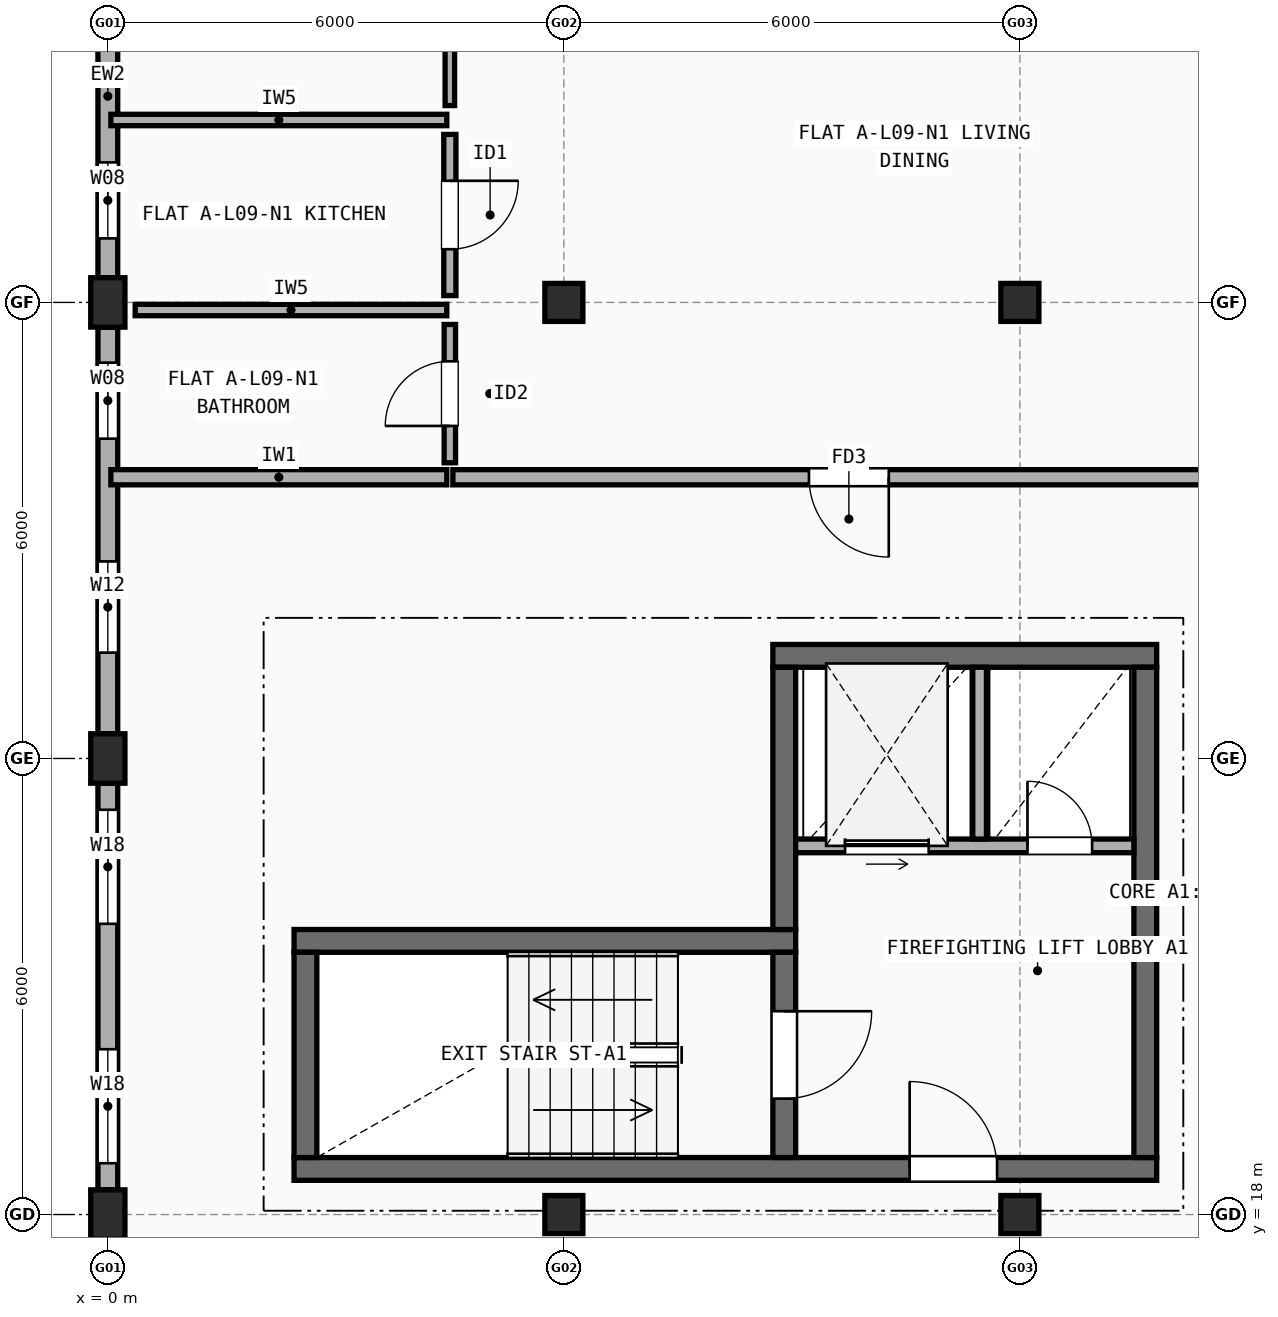
"""IFC4 building model, lengths in metres.
Left out: names, types, materials, properties, quantities, classifications, styles, units other than length and angle.
Written with IfcOpenShell. Run it as: python <this file> out.ifc"""

import sys

from ifc_helpers import new_model, si_unit, direction, frame, frame_2d, origin, origin_2d, place, context, subcontext, project, spatial, rectangle, extrude, element, fill, save


model = new_model("IFC4")
c1 = context("Model", 3, precision=1e-05, world=origin(), true_north=direction((0.0, 1.0)))
c2 = subcontext(c1, "Body", "Model", "MODEL_VIEW")
j1 = project(units=[si_unit("LENGTHUNIT", "METRE"), si_unit("PLANEANGLEUNIT", "RADIAN")], contexts=[c1])
p1 = place(None, origin())
s1 = spatial("IfcSite", under=j1, at=p1, CompositionType="ELEMENT")
p2 = place(p1, origin())
s2 = spatial("IfcBuilding", under=s1, at=p2, CompositionType="ELEMENT")
p3 = place(p2, frame((0.0, 0.0, 30.1)))
s3 = spatial("IfcBuildingStorey", under=s2, at=p3, CompositionType="ELEMENT", Elevation=30.1)
for number, where, z_axis, x_axis in (
    (1, (0.0, 18.0, 0.0), (0.0, 0.0, 1.0), (1.0, 0.0, 0.0)),
    (2, (0.0, 24.0, 0.0), (0.0, 0.0, 1.0), (1.0, 0.0, 0.0)),
    (3, (0.0, 30.0, 0.0), (0.0, 0.0, 1.0), (1.0, 0.0, 0.0)),
):
    element("IfcColumn", number, at=place(p3, frame(where, z_axis=z_axis, x_axis=x_axis)), inside=s3, PredefinedType="COLUMN", context=c2, shape_type="SweptSolid", body=[
        extrude(rectangle(XDim=0.45, YDim=0.65, at=origin_2d()), origin(), (0.0, 0.0, 1.0), 2.985),
    ])
for number, where, z_axis, x_axis in (
    (4, (6.0, 18.0, 0.0), (0.0, 0.0, 1.0), (1.0, 0.0, 0.0)),
    (5, (6.0, 30.0, 0.0), (0.0, 0.0, 1.0), (1.0, 0.0, 0.0)),
    (6, (12.0, 18.0, 0.0), (0.0, 0.0, 1.0), (1.0, 0.0, 0.0)),
    (7, (12.0, 30.0, 0.0), (0.0, 0.0, 1.0), (1.0, 0.0, 0.0)),
):
    element("IfcColumn", number, at=place(p3, frame(where, z_axis=z_axis, x_axis=x_axis)), inside=s3, PredefinedType="COLUMN", context=c2, shape_type="SweptSolid", body=[
        extrude(rectangle(XDim=0.5, YDim=0.5, at=origin_2d()), origin(), (0.0, 0.0, 1.0), 2.985),
    ])
p4 = place(p3, frame((0.0, 35.675, 0.0), z_axis=(0.0, 0.0, 1.0), x_axis=(0.0, -1.0, 0.0)))
e8 = element("IfcWall", 8, at=p4, inside=s3, PredefinedType="STANDARD", context=c2, shape_type="SweptSolid", body=[
    extrude(rectangle(XDim=5.35, YDim=0.26, at=frame_2d((2.675, 0.0))), origin(), (0.0, 0.0, 1.0), 2.467),
])
p5 = place(p4, frame((1.143, 0.0, 0.9)))
e9 = element("IfcOpeningElement", 9, at=p5, cuts=e8, PredefinedType="OPENING", context=c2, shape_type="SweptSolid", body=[
    extrude(rectangle(XDim=0.95, YDim=1.35, at=frame_2d((0.475, 0.675))), frame((0.0, 0.14, 0.0), z_axis=(0.0, -1.0, 0.0), x_axis=(1.0, 0.0, 0.0)), (0.0, 0.0, 1.0), 0.28),
])
p6 = place(p4, frame((3.833, 0.0, 0.9)))
e10 = element("IfcOpeningElement", 10, at=p6, cuts=e8, PredefinedType="OPENING", context=c2, shape_type="SweptSolid", body=[
    extrude(rectangle(XDim=1.0, YDim=1.4, at=frame_2d((0.5, 0.7))), frame((0.0, 0.14, 0.0), z_axis=(0.0, -1.0, 0.0), x_axis=(1.0, 0.0, 0.0)), (0.0, 0.0, 1.0), 0.28),
])
p7 = place(p3, frame((0.0, 29.675, 0.0), z_axis=(0.0, 0.0, 1.0), x_axis=(0.0, -1.0, 0.0)))
e11 = element("IfcWall", 11, at=p7, inside=s3, PredefinedType="STANDARD", context=c2, shape_type="SweptSolid", body=[
    extrude(rectangle(XDim=5.35, YDim=0.26, at=frame_2d((2.675, 0.0))), origin(), (0.0, 0.0, 1.0), 2.467),
])
p8 = place(p7, frame((0.468, 0.0, 0.9)))
e12 = element("IfcOpeningElement", 12, at=p8, cuts=e11, PredefinedType="OPENING", context=c2, shape_type="SweptSolid", body=[
    extrude(rectangle(XDim=1.0, YDim=1.4, at=frame_2d((0.5, 0.7))), frame((0.0, 0.14, 0.0), z_axis=(0.0, -1.0, 0.0), x_axis=(1.0, 0.0, 0.0)), (0.0, 0.0, 1.0), 0.28),
])
p9 = place(p7, frame((3.083, 0.0, 0.9)))
e13 = element("IfcOpeningElement", 13, at=p9, cuts=e11, PredefinedType="OPENING", context=c2, shape_type="SweptSolid", body=[
    extrude(rectangle(XDim=1.2, YDim=1.35, at=frame_2d((0.6, 0.675))), frame((0.0, 0.14, 0.0), z_axis=(0.0, -1.0, 0.0), x_axis=(1.0, 0.0, 0.0)), (0.0, 0.0, 1.0), 0.28),
])
p10 = place(p3, frame((0.0, 23.675, 0.0), z_axis=(0.0, 0.0, 1.0), x_axis=(0.0, -1.0, 0.0)))
e14 = element("IfcWall", 14, at=p10, inside=s3, PredefinedType="STANDARD", context=c2, shape_type="SweptSolid", body=[
    extrude(rectangle(XDim=5.35, YDim=0.26, at=frame_2d((2.675, 0.0))), origin(), (0.0, 0.0, 1.0), 2.467),
])
p11 = place(p10, frame((0.35, 0.0, 0.9)))
e15 = element("IfcOpeningElement", 15, at=p11, cuts=e14, PredefinedType="OPENING", context=c2, shape_type="SweptSolid", body=[
    extrude(rectangle(XDim=1.5, YDim=1.4, at=frame_2d((0.75, 0.7))), frame((0.0, 0.14, 0.0), z_axis=(0.0, -1.0, 0.0), x_axis=(1.0, 0.0, 0.0)), (0.0, 0.0, 1.0), 0.28),
])
p12 = place(p10, frame((3.5, 0.0, 0.9)))
e16 = element("IfcOpeningElement", 16, at=p12, cuts=e14, PredefinedType="OPENING", context=c2, shape_type="SweptSolid", body=[
    extrude(rectangle(XDim=1.5, YDim=1.4, at=frame_2d((0.75, 0.7))), frame((0.0, 0.14, 0.0), z_axis=(0.0, -1.0, 0.0), x_axis=(1.0, 0.0, 0.0)), (0.0, 0.0, 1.0), 0.28),
])
p13 = place(p3, frame((2.45, 18.6, 0.0), z_axis=(0.0, 0.0, 1.0), x_axis=(1.0, 0.0, 0.0)))
e17 = element("IfcWall", 17, at=p13, inside=s3, PredefinedType="SHEAR", context=c2, shape_type="SweptSolid", body=[
    extrude(rectangle(XDim=11.35, YDim=0.3, at=frame_2d((5.675, 0.0))), origin(), (0.0, 0.0, 1.0), 2.985),
])
p14 = place(p13, frame((8.1, 0.0, 0.0)))
e18 = element("IfcOpeningElement", 18, at=p14, cuts=e17, PredefinedType="OPENING", context=c2, shape_type="SweptSolid", body=[
    extrude(rectangle(XDim=1.15, YDim=2.15, at=frame_2d((0.575, 1.075))), frame((0.0, 0.16, 0.0), z_axis=(0.0, -1.0, 0.0), x_axis=(1.0, 0.0, 0.0)), (0.0, 0.0, 1.0), 0.32),
])
p15 = place(p3, frame((9.05, 21.6, 0.0), z_axis=(0.0, 0.0, 1.0), x_axis=(-1.0, 0.0, 0.0)))
e19 = element("IfcWall", 19, at=p15, inside=s3, PredefinedType="SHEAR", context=c2, shape_type="SweptSolid", body=[
    extrude(rectangle(XDim=6.6, YDim=0.3, at=frame_2d((3.3, 0.0))), origin(), (0.0, 0.0, 1.0), 2.985),
])
p16 = place(p3, frame((2.6, 21.45, 0.0), z_axis=(0.0, 0.0, 1.0), x_axis=(0.0, -1.0, 0.0)))
e20 = element("IfcWall", 20, at=p16, inside=s3, PredefinedType="SHEAR", context=c2, shape_type="SweptSolid", body=[
    extrude(rectangle(XDim=2.7, YDim=0.3, at=frame_2d((1.35, 0.0))), origin(), (0.0, 0.0, 1.0), 2.985),
])
p17 = place(p3, frame((8.9, 18.75, 0.0), z_axis=(0.0, 0.0, 1.0), x_axis=(0.0, 1.0, 0.0)))
e21 = element("IfcWall", 21, at=p17, inside=s3, PredefinedType="SHEAR", context=c2, shape_type="SweptSolid", body=[
    extrude(rectangle(XDim=2.7, YDim=0.3, at=frame_2d((1.35, 0.0))), origin(), (0.0, 0.0, 1.0), 2.985),
])
p18 = place(p17, frame((0.775, 0.0, 0.0)))
e22 = element("IfcOpeningElement", 22, at=p18, cuts=e21, PredefinedType="OPENING", context=c2, shape_type="SweptSolid", body=[
    extrude(rectangle(XDim=1.15, YDim=2.15, at=frame_2d((0.575, 1.075))), frame((0.0, 0.16, 0.0), z_axis=(0.0, -1.0, 0.0), x_axis=(1.0, 0.0, 0.0)), (0.0, 0.0, 1.0), 0.32),
])
p19 = place(p3, frame((13.8, 25.35, 0.0), z_axis=(0.0, 0.0, 1.0), x_axis=(-1.0, 0.0, 0.0)))
e23 = element("IfcWall", 23, at=p19, inside=s3, PredefinedType="SHEAR", context=c2, shape_type="SweptSolid", body=[
    extrude(rectangle(XDim=5.05, YDim=0.3, at=frame_2d((2.525, 0.0))), origin(), (0.0, 0.0, 1.0), 2.985),
])
p20 = place(p3, frame((13.65, 18.75, 0.0), z_axis=(0.0, 0.0, 1.0), x_axis=(0.0, 1.0, 0.0)))
e24 = element("IfcWall", 24, at=p20, inside=s3, PredefinedType="SHEAR", context=c2, shape_type="SweptSolid", body=[
    extrude(rectangle(XDim=6.45, YDim=0.3, at=frame_2d((3.225, 0.0))), origin(), (0.0, 0.0, 1.0), 2.985),
])
p21 = place(p3, frame((8.9, 21.75, 0.0), z_axis=(0.0, 0.0, 1.0), x_axis=(0.0, 1.0, 0.0)))
e25 = element("IfcWall", 25, at=p21, inside=s3, PredefinedType="SHEAR", context=c2, shape_type="SweptSolid", body=[
    extrude(rectangle(XDim=3.45, YDim=0.3, at=frame_2d((1.725, 0.0))), origin(), (0.0, 0.0, 1.0), 2.985),
])
p22 = place(p3, frame((9.05, 22.85, 0.0), z_axis=(0.0, 0.0, 1.0), x_axis=(1.0, 0.0, 0.0)))
e26 = element("IfcWall", 26, at=p22, inside=s3, PredefinedType="SOLIDWALL", context=c2, shape_type="SweptSolid", body=[
    extrude(rectangle(XDim=4.45, YDim=0.18, at=frame_2d((2.225, 0.0))), origin(), (0.0, 0.0, 1.0), 2.985),
])
p23 = place(p22, frame((0.65, 0.0, 0.0)))
e27 = element("IfcOpeningElement", 27, at=p23, cuts=e26, PredefinedType="OPENING", context=c2, shape_type="SweptSolid", body=[
    extrude(rectangle(XDim=1.1, YDim=2.15, at=frame_2d((0.55, 1.075))), frame((0.0, 0.1, 0.0), z_axis=(0.0, -1.0, 0.0), x_axis=(1.0, 0.0, 0.0)), (0.0, 0.0, 1.0), 0.2),
])
p24 = place(p22, frame((3.05, 0.0, 0.0)))
e28 = element("IfcOpeningElement", 28, at=p24, cuts=e26, PredefinedType="OPENING", context=c2, shape_type="SweptSolid", body=[
    extrude(rectangle(XDim=0.85, YDim=2.1, at=frame_2d((0.425, 1.05))), frame((0.0, 0.1, 0.0), z_axis=(0.0, -1.0, 0.0), x_axis=(1.0, 0.0, 0.0)), (0.0, 0.0, 1.0), 0.2),
])
p25 = place(p3, frame((11.47, 22.94, 0.0), z_axis=(0.0, 0.0, 1.0), x_axis=(0.0, 1.0, 0.0)))
e29 = element("IfcWall", 29, at=p25, inside=s3, PredefinedType="SOLIDWALL", context=c2, shape_type="SweptSolid", body=[
    extrude(rectangle(XDim=2.26, YDim=0.18, at=frame_2d((1.13, 0.0))), origin(), (0.0, 0.0, 1.0), 2.985),
])
p26 = place(p3, frame((0.04, 27.7, 0.0), z_axis=(0.0, 0.0, 1.0), x_axis=(1.0, 0.0, 0.0)))
e30 = element("IfcWall", 30, at=p26, inside=s3, PredefinedType="SOLIDWALL", context=c2, shape_type="SweptSolid", body=[
    extrude(rectangle(XDim=4.42, YDim=0.2, at=frame_2d((2.21, 0.0))), origin(), (0.0, 0.0, 1.0), 2.467),
])
p27 = place(p3, frame((4.54, 27.7, 0.0), z_axis=(0.0, 0.0, 1.0), x_axis=(1.0, 0.0, 0.0)))
e31 = element("IfcWall", 31, at=p27, inside=s3, PredefinedType="SOLIDWALL", context=c2, shape_type="SweptSolid", body=[
    extrude(rectangle(XDim=10.42, YDim=0.2, at=frame_2d((5.21, 0.0))), origin(), (0.0, 0.0, 1.0), 2.508),
])
p28 = place(p27, frame((4.685, 0.0, 0.0)))
e32 = element("IfcOpeningElement", 32, at=p28, cuts=e31, PredefinedType="OPENING", context=c2, shape_type="SweptSolid", body=[
    extrude(rectangle(XDim=1.05, YDim=2.15, at=frame_2d((0.525, 1.075))), frame((0.0, 0.11, 0.0), z_axis=(0.0, -1.0, 0.0), x_axis=(1.0, 0.0, 0.0)), (0.0, 0.0, 1.0), 0.22),
])
p29 = place(p3, frame((4.5, 32.59, 0.0), z_axis=(0.0, 0.0, 1.0), x_axis=(0.0, 1.0, 0.0)))
e33 = element("IfcWall", 33, at=p29, inside=s3, PredefinedType="PARTITIONING", context=c2, shape_type="SweptSolid", body=[
    extrude(rectangle(XDim=3.22, YDim=0.125, at=frame_2d((1.61, 0.0))), origin(), (0.0, 0.0, 1.0), 2.985),
])
p30 = place(p29, frame((1.17, 0.0, 0.0)))
e34 = element("IfcOpeningElement", 34, at=p30, cuts=e33, PredefinedType="OPENING", context=c2, shape_type="SweptSolid", body=[
    extrude(rectangle(XDim=0.88, YDim=2.1, at=frame_2d((0.44, 1.05))), frame((0.0, 0.073, 0.0), z_axis=(0.0, -1.0, 0.0), x_axis=(1.0, 0.0, 0.0)), (0.0, 0.0, 1.0), 0.145),
])
p31 = place(p3, frame((4.5, 30.09, 0.0), z_axis=(0.0, 0.0, 1.0), x_axis=(0.0, 1.0, 0.0)))
e35 = element("IfcWall", 35, at=p31, inside=s3, PredefinedType="PLUMBINGWALL", context=c2, shape_type="SweptSolid", body=[
    extrude(rectangle(XDim=2.12, YDim=0.16, at=frame_2d((1.06, 0.0))), origin(), (0.0, 0.0, 1.0), 2.467),
])
p32 = place(p31, frame((0.61, 0.0, 0.0)))
e36 = element("IfcOpeningElement", 36, at=p32, cuts=e35, PredefinedType="OPENING", context=c2, shape_type="SweptSolid", body=[
    extrude(rectangle(XDim=0.9, YDim=2.1, at=frame_2d((0.45, 1.05))), frame((0.0, 0.09, 0.0), z_axis=(0.0, -1.0, 0.0), x_axis=(1.0, 0.0, 0.0)), (0.0, 0.0, 1.0), 0.18),
])
p33 = place(p3, frame((4.5, 27.89, 0.0), z_axis=(0.0, 0.0, 1.0), x_axis=(0.0, 1.0, 0.0)))
e37 = element("IfcWall", 37, at=p33, inside=s3, PredefinedType="PARTITIONING", context=c2, shape_type="SweptSolid", body=[
    extrude(rectangle(XDim=1.82, YDim=0.15, at=frame_2d((0.91, 0.0))), origin(), (0.0, 0.0, 1.0), 2.985),
])
p34 = place(p33, frame((0.485, 0.0, 0.0)))
e38 = element("IfcOpeningElement", 38, at=p34, cuts=e37, PredefinedType="OPENING", context=c2, shape_type="SweptSolid", body=[
    extrude(rectangle(XDim=0.85, YDim=2.1, at=frame_2d((0.425, 1.05))), frame((0.0, 0.085, 0.0), z_axis=(0.0, -1.0, 0.0), x_axis=(1.0, 0.0, 0.0)), (0.0, 0.0, 1.0), 0.17),
])
p35 = place(p3, frame((0.04, 32.4, 0.0), z_axis=(0.0, 0.0, 1.0), x_axis=(1.0, 0.0, 0.0)))
e39 = element("IfcWall", 39, at=p35, inside=s3, PredefinedType="PARTITIONING", context=c2, shape_type="SweptSolid", body=[
    extrude(rectangle(XDim=4.42, YDim=0.15, at=frame_2d((2.21, 0.0))), origin(), (0.0, 0.0, 1.0), 2.467),
])
p36 = place(p3, frame((0.36, 29.9, 0.0), z_axis=(0.0, 0.0, 1.0), x_axis=(1.0, 0.0, 0.0)))
e40 = element("IfcWall", 40, at=p36, inside=s3, PredefinedType="PARTITIONING", context=c2, shape_type="SweptSolid", body=[
    extrude(rectangle(XDim=4.1, YDim=0.15, at=frame_2d((2.05, 0.0))), origin(), (0.0, 0.0, 1.0), 2.467),
])
p37 = place(p6, origin())
e41 = element("IfcWindow", 41, at=p37, inside=s3, PartitioningType="SINGLE_PANEL", PredefinedType="WINDOW", context=c2, shape_type="SweptSolid", body=[
    extrude(rectangle(XDim=1.0, YDim=1.4, at=frame_2d((0.5, 0.7))), frame((0.0, 0.03, 0.0), z_axis=(0.0, -1.0, 0.0), x_axis=(1.0, 0.0, 0.0)), (0.0, 0.0, 1.0), 0.06),
])
fill(e10, e41)
p38 = place(p8, origin())
e42 = element("IfcWindow", 42, at=p38, inside=s3, PartitioningType="SINGLE_PANEL", PredefinedType="WINDOW", context=c2, shape_type="SweptSolid", body=[
    extrude(rectangle(XDim=1.0, YDim=1.4, at=frame_2d((0.5, 0.7))), frame((0.0, 0.03, 0.0), z_axis=(0.0, -1.0, 0.0), x_axis=(1.0, 0.0, 0.0)), (0.0, 0.0, 1.0), 0.06),
])
fill(e12, e42)
p39 = place(p9, origin())
e43 = element("IfcWindow", 43, at=p39, inside=s3, PartitioningType="SINGLE_PANEL", PredefinedType="WINDOW", context=c2, shape_type="SweptSolid", body=[
    extrude(rectangle(XDim=1.2, YDim=1.35, at=frame_2d((0.6, 0.675))), frame((0.0, 0.03, 0.0), z_axis=(0.0, -1.0, 0.0), x_axis=(1.0, 0.0, 0.0)), (0.0, 0.0, 1.0), 0.06),
])
fill(e13, e43)
p40 = place(p11, origin())
e44 = element("IfcWindow", 44, at=p40, inside=s3, PartitioningType="SINGLE_PANEL", PredefinedType="WINDOW", context=c2, shape_type="SweptSolid", body=[
    extrude(rectangle(XDim=1.5, YDim=1.4, at=frame_2d((0.75, 0.7))), frame((0.0, 0.03, 0.0), z_axis=(0.0, -1.0, 0.0), x_axis=(1.0, 0.0, 0.0)), (0.0, 0.0, 1.0), 0.06),
])
fill(e15, e44)
p41 = place(p12, origin())
e45 = element("IfcWindow", 45, at=p41, inside=s3, PartitioningType="SINGLE_PANEL", PredefinedType="WINDOW", context=c2, shape_type="SweptSolid", body=[
    extrude(rectangle(XDim=1.5, YDim=1.4, at=frame_2d((0.75, 0.7))), frame((0.0, 0.03, 0.0), z_axis=(0.0, -1.0, 0.0), x_axis=(1.0, 0.0, 0.0)), (0.0, 0.0, 1.0), 0.06),
])
fill(e16, e45)
p42 = place(p14, origin())
e46 = element("IfcDoor", 46, at=p42, inside=s3, OperationType="SINGLE_SWING_LEFT", PredefinedType="DOOR", context=c2, shape_type="SweptSolid", body=[
    extrude(rectangle(XDim=1.15, YDim=2.15, at=frame_2d((0.575, 1.075))), frame((0.0, 0.025, 0.0), z_axis=(0.0, -1.0, 0.0), x_axis=(1.0, 0.0, 0.0)), (0.0, 0.0, 1.0), 0.05),
])
fill(e18, e46)
p43 = place(p18, origin())
e47 = element("IfcDoor", 47, at=p43, inside=s3, OperationType="SINGLE_SWING_RIGHT", PredefinedType="DOOR", context=c2, shape_type="SweptSolid", body=[
    extrude(rectangle(XDim=1.15, YDim=2.15, at=frame_2d((0.575, 1.075))), frame((0.0, 0.025, 0.0), z_axis=(0.0, -1.0, 0.0), x_axis=(1.0, 0.0, 0.0)), (0.0, 0.0, 1.0), 0.05),
])
fill(e22, e47)
p44 = place(p23, origin())
e48 = element("IfcDoor", 48, at=p44, inside=s3, OperationType="SLIDING_TO_LEFT", PredefinedType="DOOR", context=c2, shape_type="SweptSolid", body=[
    extrude(rectangle(XDim=1.1, YDim=2.15, at=frame_2d((0.55, 1.075))), frame((0.0, 0.025, 0.0), z_axis=(0.0, -1.0, 0.0), x_axis=(1.0, 0.0, 0.0)), (0.0, 0.0, 1.0), 0.05),
])
fill(e27, e48)
p45 = place(p24, frame((0.85, 0.0, 0.0), z_axis=(0.0, 0.0, 1.0), x_axis=(-1.0, 0.0, 0.0)))
e49 = element("IfcDoor", 49, at=p45, inside=s3, OperationType="SINGLE_SWING_LEFT", PredefinedType="DOOR", context=c2, shape_type="SweptSolid", body=[
    extrude(rectangle(XDim=0.85, YDim=2.1, at=frame_2d((0.425, 1.05))), frame((0.0, 0.025, 0.0), z_axis=(0.0, -1.0, 0.0), x_axis=(1.0, 0.0, 0.0)), (0.0, 0.0, 1.0), 0.05),
])
fill(e28, e49)
p46 = place(p28, origin())
e50 = element("IfcDoor", 50, at=p46, inside=s3, OperationType="SINGLE_SWING_RIGHT", PredefinedType="DOOR", context=c2, shape_type="SweptSolid", body=[
    extrude(rectangle(XDim=1.05, YDim=2.15, at=frame_2d((0.525, 1.075))), frame((0.0, 0.025, 0.0), z_axis=(0.0, -1.0, 0.0), x_axis=(1.0, 0.0, 0.0)), (0.0, 0.0, 1.0), 0.05),
])
fill(e32, e50)
p47 = place(p32, origin())
e51 = element("IfcDoor", 51, at=p47, inside=s3, OperationType="SINGLE_SWING_RIGHT", PredefinedType="DOOR", context=c2, shape_type="SweptSolid", body=[
    extrude(rectangle(XDim=0.9, YDim=2.1, at=frame_2d((0.45, 1.05))), frame((0.0, 0.025, 0.0), z_axis=(0.0, -1.0, 0.0), x_axis=(1.0, 0.0, 0.0)), (0.0, 0.0, 1.0), 0.05),
])
fill(e36, e51)
p48 = place(p34, origin())
e52 = element("IfcDoor", 52, at=p48, inside=s3, OperationType="SINGLE_SWING_LEFT", PredefinedType="DOOR", context=c2, shape_type="SweptSolid", body=[
    extrude(rectangle(XDim=0.85, YDim=2.1, at=frame_2d((0.425, 1.05))), frame((0.0, 0.025, 0.0), z_axis=(0.0, -1.0, 0.0), x_axis=(1.0, 0.0, 0.0)), (0.0, 0.0, 1.0), 0.05),
])
fill(e38, e52)
save(model, sys.argv[1])
